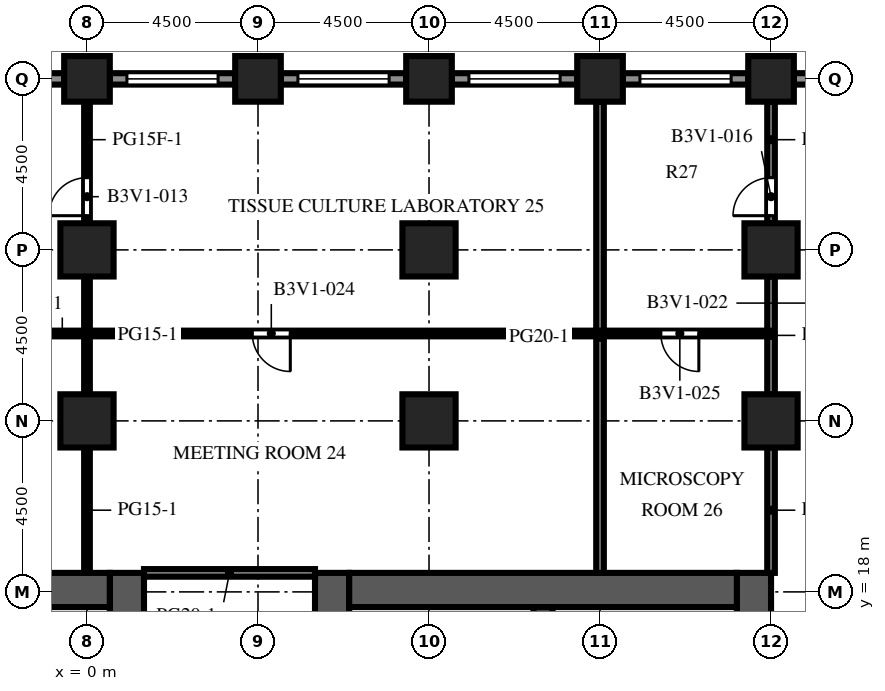
"""IFC4 building model, lengths in metres.
Left out: names, types, materials, properties, quantities, classifications, styles, units other than length and angle.
Written with IfcOpenShell. Run it as: python <this file> out.ifc"""

import sys

from ifc_helpers import new_model, si_unit, direction, frame, frame_2d, origin, origin_2d, place, context, subcontext, project, spatial, rectangle, extrude, element, fill, save


model = new_model("IFC4")
c1 = context("Model", 3, precision=1e-05, world=origin(), true_north=direction((0.0, 1.0)))
c2 = subcontext(c1, "Body", "Model", "MODEL_VIEW")
j1 = project(units=[si_unit("LENGTHUNIT", "METRE"), si_unit("PLANEANGLEUNIT", "RADIAN")], contexts=[c1])
p1 = place(None, origin())
s1 = spatial("IfcSite", under=j1, at=p1, CompositionType="ELEMENT")
p2 = place(p1, origin())
s2 = spatial("IfcBuilding", under=s1, at=p2, CompositionType="ELEMENT")
p3 = place(p2, frame((0.0, 0.0, 90.2)))
s3 = spatial("IfcBuildingStorey", under=s2, at=p3, CompositionType="ELEMENT", Elevation=90.2)
for number, where, z_axis, x_axis in (
    (1, (0.0, 31.5, 0.0), (0.0, 0.0, 1.0), (1.0, 0.0, 0.0)),
    (2, (4.5, 31.5, 0.0), (0.0, 0.0, 1.0), (1.0, 0.0, 0.0)),
    (3, (9.0, 31.5, 0.0), (0.0, 0.0, 1.0), (1.0, 0.0, 0.0)),
    (4, (13.5, 31.5, 0.0), (0.0, 0.0, 1.0), (1.0, 0.0, 0.0)),
    (5, (18.0, 31.5, 0.0), (0.0, 0.0, 1.0), (1.0, 0.0, 0.0)),
):
    element("IfcColumn", number, at=place(p3, frame(where, z_axis=z_axis, x_axis=x_axis)), inside=s3, PredefinedType="COLUMN", context=c2, shape_type="SweptSolid", body=[
        extrude(rectangle(XDim=1.2, YDim=1.2, at=origin_2d()), origin(), (0.0, 0.0, 1.0), 4.1),
    ])
for number, where, z_axis, x_axis in (
    (6, (0.0, 22.5, 0.0), (0.0, 0.0, 1.0), (1.0, 0.0, 0.0)),
    (7, (0.0, 27.0, 0.0), (0.0, 0.0, 1.0), (1.0, 0.0, 0.0)),
    (8, (9.0, 22.5, 0.0), (0.0, 0.0, 1.0), (1.0, 0.0, 0.0)),
    (9, (9.0, 27.0, 0.0), (0.0, 0.0, 1.0), (1.0, 0.0, 0.0)),
    (10, (18.0, 22.5, 0.0), (0.0, 0.0, 1.0), (1.0, 0.0, 0.0)),
    (11, (18.0, 27.0, 0.0), (0.0, 0.0, 1.0), (1.0, 0.0, 0.0)),
):
    element("IfcColumn", number, at=place(p3, frame(where, z_axis=z_axis, x_axis=x_axis)), inside=s3, PredefinedType="COLUMN", context=c2, shape_type="SweptSolid", body=[
        extrude(rectangle(XDim=1.4, YDim=1.4, at=origin_2d()), origin(), (0.0, 0.0, 1.0), 4.1),
    ])
p4 = place(p3, frame((1.05, -9.0, 0.0), z_axis=(0.0, 0.0, 1.0), x_axis=(0.0, 1.0, 0.0)))
e12 = element("IfcWall", 12, at=p4, inside=s3, PredefinedType="SHEAR", context=c2, shape_type="SweptSolid", body=[
    extrude(rectangle(XDim=27.5, YDim=0.9, at=frame_2d((13.75, 0.0))), origin(), (0.0, 0.0, 1.0), 4.1),
])
p5 = place(p4, frame((12.55, 0.0, 0.0)))
e13 = element("IfcOpeningElement", 13, at=p5, cuts=e12, PredefinedType="OPENING", context=c2, shape_type="SweptSolid", body=[
    extrude(rectangle(XDim=2.4, YDim=2.4, at=frame_2d((1.2, 1.2))), frame((0.0, 0.46, 0.0), z_axis=(0.0, -1.0, 0.0), x_axis=(1.0, 0.0, 0.0)), (0.0, 0.0, 1.0), 0.92),
])
p6 = place(p4, frame((3.975, 0.0, 0.0)))
e14 = element("IfcOpeningElement", 14, at=p6, cuts=e12, PredefinedType="OPENING", context=c2, shape_type="SweptSolid", body=[
    extrude(rectangle(XDim=1.2, YDim=2.1, at=frame_2d((0.6, 1.05))), frame((0.0, 0.46, 0.0), z_axis=(0.0, -1.0, 0.0), x_axis=(1.0, 0.0, 0.0)), (0.0, 0.0, 1.0), 0.92),
])
p7 = place(p4, frame((22.325, 0.0, 0.0)))
e15 = element("IfcOpeningElement", 15, at=p7, cuts=e12, PredefinedType="OPENING", context=c2, shape_type="SweptSolid", body=[
    extrude(rectangle(XDim=1.2, YDim=2.1, at=frame_2d((0.6, 1.05))), frame((0.0, 0.46, 0.0), z_axis=(0.0, -1.0, 0.0), x_axis=(1.0, 0.0, 0.0)), (0.0, 0.0, 1.0), 0.92),
])
p8 = place(p3, frame((-9.6, 18.05, 0.0), z_axis=(0.0, 0.0, 1.0), x_axis=(1.0, 0.0, 0.0)))
e16 = element("IfcWall", 16, at=p8, inside=s3, PredefinedType="SHEAR", context=c2, shape_type="SweptSolid", body=[
    extrude(rectangle(XDim=10.2, YDim=0.9, at=frame_2d((5.1, 0.0))), origin(), (0.0, 0.0, 1.0), 4.1),
])
p9 = place(p3, frame((6.45, -9.0, 0.0), z_axis=(0.0, 0.0, 1.0), x_axis=(0.0, 1.0, 0.0)))
e17 = element("IfcWall", 17, at=p9, inside=s3, PredefinedType="SHEAR", context=c2, shape_type="SweptSolid", body=[
    extrude(rectangle(XDim=27.5, YDim=0.9, at=frame_2d((13.75, 0.0))), origin(), (0.0, 0.0, 1.0), 4.1),
])
p10 = place(p9, frame((12.55, 0.0, 0.0)))
e18 = element("IfcOpeningElement", 18, at=p10, cuts=e17, PredefinedType="OPENING", context=c2, shape_type="SweptSolid", body=[
    extrude(rectangle(XDim=2.4, YDim=2.4, at=frame_2d((1.2, 1.2))), frame((0.0, 0.46, 0.0), z_axis=(0.0, -1.0, 0.0), x_axis=(1.0, 0.0, 0.0)), (0.0, 0.0, 1.0), 0.92),
])
p11 = place(p9, frame((3.975, 0.0, 0.0)))
e19 = element("IfcOpeningElement", 19, at=p11, cuts=e17, PredefinedType="OPENING", context=c2, shape_type="SweptSolid", body=[
    extrude(rectangle(XDim=1.2, YDim=2.1, at=frame_2d((0.6, 1.05))), frame((0.0, 0.46, 0.0), z_axis=(0.0, -1.0, 0.0), x_axis=(1.0, 0.0, 0.0)), (0.0, 0.0, 1.0), 0.92),
])
p12 = place(p9, frame((22.325, 0.0, 0.0)))
e20 = element("IfcOpeningElement", 20, at=p12, cuts=e17, PredefinedType="OPENING", context=c2, shape_type="SweptSolid", body=[
    extrude(rectangle(XDim=1.2, YDim=2.1, at=frame_2d((0.6, 1.05))), frame((0.0, 0.46, 0.0), z_axis=(0.0, -1.0, 0.0), x_axis=(1.0, 0.0, 0.0)), (0.0, 0.0, 1.0), 0.92),
])
p13 = place(p3, frame((17.55, -9.0, 0.0), z_axis=(0.0, 0.0, 1.0), x_axis=(0.0, 1.0, 0.0)))
e21 = element("IfcWall", 21, at=p13, inside=s3, PredefinedType="SHEAR", context=c2, shape_type="SweptSolid", body=[
    extrude(rectangle(XDim=27.5, YDim=0.9, at=frame_2d((13.75, 0.0))), origin(), (0.0, 0.0, 1.0), 4.1),
])
p14 = place(p13, frame((12.55, 0.0, 0.0)))
e22 = element("IfcOpeningElement", 22, at=p14, cuts=e21, PredefinedType="OPENING", context=c2, shape_type="SweptSolid", body=[
    extrude(rectangle(XDim=2.4, YDim=2.4, at=frame_2d((1.2, 1.2))), frame((0.0, 0.46, 0.0), z_axis=(0.0, -1.0, 0.0), x_axis=(1.0, 0.0, 0.0)), (0.0, 0.0, 1.0), 0.92),
])
p15 = place(p13, frame((6.825, 0.0, 0.0)))
e23 = element("IfcOpeningElement", 23, at=p15, cuts=e21, PredefinedType="OPENING", context=c2, shape_type="SweptSolid", body=[
    extrude(rectangle(XDim=1.2, YDim=2.1, at=frame_2d((0.6, 1.05))), frame((0.0, 0.46, 0.0), z_axis=(0.0, -1.0, 0.0), x_axis=(1.0, 0.0, 0.0)), (0.0, 0.0, 1.0), 0.92),
])
p16 = place(p13, frame((19.475, 0.0, 0.0)))
e24 = element("IfcOpeningElement", 24, at=p16, cuts=e21, PredefinedType="OPENING", context=c2, shape_type="SweptSolid", body=[
    extrude(rectangle(XDim=1.2, YDim=2.1, at=frame_2d((0.6, 1.05))), frame((0.0, 0.46, 0.0), z_axis=(0.0, -1.0, 0.0), x_axis=(1.0, 0.0, 0.0)), (0.0, 0.0, 1.0), 0.92),
])
p17 = place(p3, frame((6.9, 18.05, 0.0), z_axis=(0.0, 0.0, 1.0), x_axis=(1.0, 0.0, 0.0)))
e25 = element("IfcWall", 25, at=p17, inside=s3, PredefinedType="SHEAR", context=c2, shape_type="SweptSolid", body=[
    extrude(rectangle(XDim=10.2, YDim=0.9, at=frame_2d((5.1, 0.0))), origin(), (0.0, 0.0, 1.0), 4.1),
])
p18 = place(p3, frame((12.0, 10.25, 0.0), z_axis=(0.0, 0.0, 1.0), x_axis=(0.0, 1.0, 0.0)))
e26 = element("IfcWall", 26, at=p18, inside=s3, PredefinedType="SHEAR", context=c2, shape_type="SweptSolid", body=[
    extrude(rectangle(XDim=7.35, YDim=0.5, at=frame_2d((3.675, 0.0))), origin(), (0.0, 0.0, 1.0), 4.1),
])
p19 = place(p3, frame((18.6, 31.5, 0.0), z_axis=(0.0, 0.0, 1.0), x_axis=(1.0, 0.0, 0.0)))
e27 = element("IfcWall", 27, at=p19, inside=s3, PredefinedType="SOLIDWALL", context=c2, shape_type="SweptSolid", body=[
    extrude(rectangle(XDim=3.3, YDim=0.3, at=frame_2d((1.65, 0.0))), origin(), (0.0, 0.0, 1.0), 2.75),
])
p20 = place(p19, frame((1.15, 0.0, 0.0)))
e28 = element("IfcOpeningElement", 28, at=p20, cuts=e27, PredefinedType="OPENING", context=c2, shape_type="SweptSolid", body=[
    extrude(rectangle(XDim=1.0, YDim=2.2, at=frame_2d((0.5, 1.1))), frame((0.0, 0.16, 0.0), z_axis=(0.0, -1.0, 0.0), x_axis=(1.0, 0.0, 0.0)), (0.0, 0.0, 1.0), 0.32),
])
p21 = place(p3, frame((14.1, 31.5, 0.0), z_axis=(0.0, 0.0, 1.0), x_axis=(1.0, 0.0, 0.0)))
e29 = element("IfcWall", 29, at=p21, inside=s3, PredefinedType="SOLIDWALL", context=c2, shape_type="SweptSolid", body=[
    extrude(rectangle(XDim=3.3, YDim=0.3, at=frame_2d((1.65, 0.0))), origin(), (0.0, 0.0, 1.0), 2.75),
])
p22 = place(p21, frame((0.45, 0.0, 0.8)))
e30 = element("IfcOpeningElement", 30, at=p22, cuts=e29, PredefinedType="OPENING", context=c2, shape_type="SweptSolid", body=[
    extrude(rectangle(XDim=2.4, YDim=1.7, at=frame_2d((1.2, 0.85))), frame((0.0, 0.16, 0.0), z_axis=(0.0, -1.0, 0.0), x_axis=(1.0, 0.0, 0.0)), (0.0, 0.0, 1.0), 0.32),
])
p23 = place(p3, frame((9.6, 31.5, 0.0), z_axis=(0.0, 0.0, 1.0), x_axis=(1.0, 0.0, 0.0)))
e31 = element("IfcWall", 31, at=p23, inside=s3, PredefinedType="SOLIDWALL", context=c2, shape_type="SweptSolid", body=[
    extrude(rectangle(XDim=3.3, YDim=0.3, at=frame_2d((1.65, 0.0))), origin(), (0.0, 0.0, 1.0), 2.75),
])
p24 = place(p23, frame((0.45, 0.0, 0.8)))
e32 = element("IfcOpeningElement", 32, at=p24, cuts=e31, PredefinedType="OPENING", context=c2, shape_type="SweptSolid", body=[
    extrude(rectangle(XDim=2.4, YDim=1.7, at=frame_2d((1.2, 0.85))), frame((0.0, 0.16, 0.0), z_axis=(0.0, -1.0, 0.0), x_axis=(1.0, 0.0, 0.0)), (0.0, 0.0, 1.0), 0.32),
])
p25 = place(p3, frame((5.1, 31.5, 0.0), z_axis=(0.0, 0.0, 1.0), x_axis=(1.0, 0.0, 0.0)))
e33 = element("IfcWall", 33, at=p25, inside=s3, PredefinedType="SOLIDWALL", context=c2, shape_type="SweptSolid", body=[
    extrude(rectangle(XDim=3.3, YDim=0.3, at=frame_2d((1.65, 0.0))), origin(), (0.0, 0.0, 1.0), 2.75),
])
p26 = place(p25, frame((0.45, 0.0, 0.8)))
e34 = element("IfcOpeningElement", 34, at=p26, cuts=e33, PredefinedType="OPENING", context=c2, shape_type="SweptSolid", body=[
    extrude(rectangle(XDim=2.4, YDim=1.7, at=frame_2d((1.2, 0.85))), frame((0.0, 0.16, 0.0), z_axis=(0.0, -1.0, 0.0), x_axis=(1.0, 0.0, 0.0)), (0.0, 0.0, 1.0), 0.32),
])
p27 = place(p3, frame((0.6, 31.5, 0.0), z_axis=(0.0, 0.0, 1.0), x_axis=(1.0, 0.0, 0.0)))
e35 = element("IfcWall", 35, at=p27, inside=s3, PredefinedType="SOLIDWALL", context=c2, shape_type="SweptSolid", body=[
    extrude(rectangle(XDim=3.3, YDim=0.3, at=frame_2d((1.65, 0.0))), origin(), (0.0, 0.0, 1.0), 2.75),
])
p28 = place(p27, frame((0.45, 0.0, 0.8)))
e36 = element("IfcOpeningElement", 36, at=p28, cuts=e35, PredefinedType="OPENING", context=c2, shape_type="SweptSolid", body=[
    extrude(rectangle(XDim=2.4, YDim=1.7, at=frame_2d((1.2, 0.85))), frame((0.0, 0.16, 0.0), z_axis=(0.0, -1.0, 0.0), x_axis=(1.0, 0.0, 0.0)), (0.0, 0.0, 1.0), 0.32),
])
p29 = place(p3, frame((-3.9, 31.5, 0.0), z_axis=(0.0, 0.0, 1.0), x_axis=(1.0, 0.0, 0.0)))
e37 = element("IfcWall", 37, at=p29, inside=s3, PredefinedType="SOLIDWALL", context=c2, shape_type="SweptSolid", body=[
    extrude(rectangle(XDim=3.3, YDim=0.3, at=frame_2d((1.65, 0.0))), origin(), (0.0, 0.0, 1.0), 2.75),
])
p30 = place(p29, frame((0.45, 0.0, 0.8)))
e38 = element("IfcOpeningElement", 38, at=p30, cuts=e37, PredefinedType="OPENING", context=c2, shape_type="SweptSolid", body=[
    extrude(rectangle(XDim=2.4, YDim=1.7, at=frame_2d((1.2, 0.85))), frame((0.0, 0.16, 0.0), z_axis=(0.0, -1.0, 0.0), x_axis=(1.0, 0.0, 0.0)), (0.0, 0.0, 1.0), 0.32),
])
p31 = place(p3, frame((-0.8, 14.807, 0.0), z_axis=(0.0, 0.0, 1.0), x_axis=(0.0, 1.0, 0.0)))
e39 = element("IfcWall", 39, at=p31, inside=s3, PredefinedType="PARTITIONING", context=c2, shape_type="SweptSolid", body=[
    extrude(rectangle(XDim=2.793, YDim=0.1, at=frame_2d((1.396, 0.0))), origin(), (0.0, 0.0, 1.0), 3.65),
])
p32 = place(p31, frame((0.896, 0.0, 0.0)))
e40 = element("IfcOpeningElement", 40, at=p32, cuts=e39, PredefinedType="OPENING", context=c2, shape_type="SweptSolid", body=[
    extrude(rectangle(XDim=1.0, YDim=2.1, at=frame_2d((0.5, 1.05))), frame((0.0, 0.06, 0.0), z_axis=(0.0, -1.0, 0.0), x_axis=(1.0, 0.0, 0.0)), (0.0, 0.0, 1.0), 0.12),
])
p33 = place(p3, frame((8.3, 14.807, 0.0), z_axis=(0.0, 0.0, 1.0), x_axis=(0.0, 1.0, 0.0)))
e41 = element("IfcWall", 41, at=p33, inside=s3, PredefinedType="PARTITIONING", context=c2, shape_type="SweptSolid", body=[
    extrude(rectangle(XDim=2.793, YDim=0.1, at=frame_2d((1.396, 0.0))), origin(), (0.0, 0.0, 1.0), 3.65),
])
p34 = place(p33, frame((0.896, 0.0, 0.0)))
e42 = element("IfcOpeningElement", 42, at=p34, cuts=e41, PredefinedType="OPENING", context=c2, shape_type="SweptSolid", body=[
    extrude(rectangle(XDim=1.0, YDim=2.1, at=frame_2d((0.5, 1.05))), frame((0.0, 0.06, 0.0), z_axis=(0.0, -1.0, 0.0), x_axis=(1.0, 0.0, 0.0)), (0.0, 0.0, 1.0), 0.12),
])
p35 = place(p3, frame((0.0, 18.5, 0.0), z_axis=(0.0, 0.0, 1.0), x_axis=(0.0, 1.0, 0.0)))
e43 = element("IfcWall", 43, at=p35, inside=s3, PredefinedType="PARTITIONING", context=c2, shape_type="SweptSolid", body=[
    extrude(rectangle(XDim=3.3, YDim=0.15, at=frame_2d((1.65, 0.0))), origin(), (0.0, 0.0, 1.0), 3.65),
])
p36 = place(p3, frame((0.0, 23.2, 0.0), z_axis=(0.0, 0.0, 1.0), x_axis=(0.0, 1.0, 0.0)))
e44 = element("IfcWall", 44, at=p36, inside=s3, PredefinedType="PARTITIONING", context=c2, shape_type="SweptSolid", body=[
    extrude(rectangle(XDim=3.1, YDim=0.15, at=frame_2d((1.55, 0.0))), origin(), (0.0, 0.0, 1.0), 3.65),
])
p37 = place(p3, frame((0.0, 30.9, 0.0), z_axis=(0.0, 0.0, 1.0), x_axis=(0.0, -1.0, 0.0)))
e45 = element("IfcWall", 45, at=p37, inside=s3, PredefinedType="PARTITIONING", context=c2, shape_type="SweptSolid", body=[
    extrude(rectangle(XDim=3.2, YDim=0.15, at=frame_2d((1.6, 0.0))), origin(), (0.0, 0.0, 1.0), 3.65),
])
p38 = place(p37, frame((2.0, 0.0, 0.0)))
e46 = element("IfcOpeningElement", 46, at=p38, cuts=e45, PredefinedType="OPENING", context=c2, shape_type="SweptSolid", body=[
    extrude(rectangle(XDim=1.0, YDim=2.1, at=frame_2d((0.5, 1.05))), frame((0.0, 0.085, 0.0), z_axis=(0.0, -1.0, 0.0), x_axis=(1.0, 0.0, 0.0)), (0.0, 0.0, 1.0), 0.17),
])
p39 = place(p3, frame((13.5, 18.5, 0.0), z_axis=(0.0, 0.0, 1.0), x_axis=(0.0, 1.0, 0.0)))
e47 = element("IfcWall", 47, at=p39, inside=s3, PredefinedType="PARTITIONING", context=c2, shape_type="SweptSolid", body=[
    extrude(rectangle(XDim=12.4, YDim=0.2, at=frame_2d((6.2, 0.0))), origin(), (0.0, 0.0, 1.0), 3.65),
])
p40 = place(p3, frame((18.0, 18.5, 0.0), z_axis=(0.0, 0.0, 1.0), x_axis=(0.0, 1.0, 0.0)))
e48 = element("IfcWall", 48, at=p40, inside=s3, PredefinedType="PARTITIONING", context=c2, shape_type="SweptSolid", body=[
    extrude(rectangle(XDim=3.3, YDim=0.2, at=frame_2d((1.65, 0.0))), origin(), (0.0, 0.0, 1.0), 3.65),
])
p41 = place(p3, frame((18.0, 23.2, 0.0), z_axis=(0.0, 0.0, 1.0), x_axis=(0.0, 1.0, 0.0)))
e49 = element("IfcWall", 49, at=p41, inside=s3, PredefinedType="PARTITIONING", context=c2, shape_type="SweptSolid", body=[
    extrude(rectangle(XDim=3.1, YDim=0.2, at=frame_2d((1.55, 0.0))), origin(), (0.0, 0.0, 1.0), 3.65),
])
p42 = place(p3, frame((18.0, 27.7, 0.0), z_axis=(0.0, 0.0, 1.0), x_axis=(0.0, 1.0, 0.0)))
e50 = element("IfcWall", 50, at=p42, inside=s3, PredefinedType="PARTITIONING", context=c2, shape_type="SweptSolid", body=[
    extrude(rectangle(XDim=3.2, YDim=0.2, at=frame_2d((1.6, 0.0))), origin(), (0.0, 0.0, 1.0), 3.65),
])
p43 = place(p42, frame((0.2, 0.0, 0.0)))
e51 = element("IfcOpeningElement", 51, at=p43, cuts=e50, PredefinedType="OPENING", context=c2, shape_type="SweptSolid", body=[
    extrude(rectangle(XDim=1.0, YDim=2.1, at=frame_2d((0.5, 1.05))), frame((0.0, 0.11, 0.0), z_axis=(0.0, -1.0, 0.0), x_axis=(1.0, 0.0, 0.0)), (0.0, 0.0, 1.0), 0.22),
])
p44 = place(p3, frame((1.5, 18.5, 0.0), z_axis=(0.0, 0.0, 1.0), x_axis=(1.0, 0.0, 0.0)))
e52 = element("IfcWall", 52, at=p44, inside=s3, PredefinedType="PARTITIONING", context=c2, shape_type="SweptSolid", body=[
    extrude(rectangle(XDim=4.5, YDim=0.2, at=frame_2d((2.25, 0.0))), origin(), (0.0, 0.0, 1.0), 3.65),
])
p45 = place(p3, frame((18.0, 24.8, 0.0), z_axis=(0.0, 0.0, 1.0), x_axis=(-1.0, 0.0, 0.0)))
e53 = element("IfcWall", 53, at=p45, inside=s3, PredefinedType="PARTITIONING", context=c2, shape_type="SweptSolid", body=[
    extrude(rectangle(XDim=28.5, YDim=0.15, at=frame_2d((14.25, 0.0))), origin(), (0.0, 0.0, 1.0), 3.65),
])
p46 = place(p45, frame((23.65, 0.0, 0.0)))
e54 = element("IfcOpeningElement", 54, at=p46, cuts=e53, PredefinedType="OPENING", context=c2, shape_type="SweptSolid", body=[
    extrude(rectangle(XDim=1.0, YDim=2.1, at=frame_2d((0.5, 1.05))), frame((0.0, 0.085, 0.0), z_axis=(0.0, -1.0, 0.0), x_axis=(1.0, 0.0, 0.0)), (0.0, 0.0, 1.0), 0.17),
])
p47 = place(p45, frame((12.65, 0.0, 0.0)))
e55 = element("IfcOpeningElement", 55, at=p47, cuts=e53, PredefinedType="OPENING", context=c2, shape_type="SweptSolid", body=[
    extrude(rectangle(XDim=1.0, YDim=2.1, at=frame_2d((0.5, 1.05))), frame((0.0, 0.085, 0.0), z_axis=(0.0, -1.0, 0.0), x_axis=(1.0, 0.0, 0.0)), (0.0, 0.0, 1.0), 0.17),
])
p48 = place(p45, frame((1.9, 0.0, 0.0)))
e56 = element("IfcOpeningElement", 56, at=p48, cuts=e53, PredefinedType="OPENING", context=c2, shape_type="SweptSolid", body=[
    extrude(rectangle(XDim=1.0, YDim=2.1, at=frame_2d((0.5, 1.05))), frame((0.0, 0.085, 0.0), z_axis=(0.0, -1.0, 0.0), x_axis=(1.0, 0.0, 0.0)), (0.0, 0.0, 1.0), 0.17),
])
p49 = place(p22, origin())
e57 = element("IfcWindow", 57, at=p49, inside=s3, PartitioningType="SINGLE_PANEL", PredefinedType="WINDOW", context=c2, shape_type="SweptSolid", body=[
    extrude(rectangle(XDim=2.4, YDim=1.7, at=frame_2d((1.2, 0.85))), frame((0.0, 0.03, 0.0), z_axis=(0.0, -1.0, 0.0), x_axis=(1.0, 0.0, 0.0)), (0.0, 0.0, 1.0), 0.06),
])
fill(e30, e57)
p50 = place(p24, origin())
e58 = element("IfcWindow", 58, at=p50, inside=s3, PartitioningType="SINGLE_PANEL", PredefinedType="WINDOW", context=c2, shape_type="SweptSolid", body=[
    extrude(rectangle(XDim=2.4, YDim=1.7, at=frame_2d((1.2, 0.85))), frame((0.0, 0.03, 0.0), z_axis=(0.0, -1.0, 0.0), x_axis=(1.0, 0.0, 0.0)), (0.0, 0.0, 1.0), 0.06),
])
fill(e32, e58)
p51 = place(p26, origin())
e59 = element("IfcWindow", 59, at=p51, inside=s3, PartitioningType="SINGLE_PANEL", PredefinedType="WINDOW", context=c2, shape_type="SweptSolid", body=[
    extrude(rectangle(XDim=2.4, YDim=1.7, at=frame_2d((1.2, 0.85))), frame((0.0, 0.03, 0.0), z_axis=(0.0, -1.0, 0.0), x_axis=(1.0, 0.0, 0.0)), (0.0, 0.0, 1.0), 0.06),
])
fill(e34, e59)
p52 = place(p28, origin())
e60 = element("IfcWindow", 60, at=p52, inside=s3, PartitioningType="SINGLE_PANEL", PredefinedType="WINDOW", context=c2, shape_type="SweptSolid", body=[
    extrude(rectangle(XDim=2.4, YDim=1.7, at=frame_2d((1.2, 0.85))), frame((0.0, 0.03, 0.0), z_axis=(0.0, -1.0, 0.0), x_axis=(1.0, 0.0, 0.0)), (0.0, 0.0, 1.0), 0.06),
])
fill(e36, e60)
p53 = place(p38, origin())
e61 = element("IfcDoor", 61, at=p53, inside=s3, OperationType="SINGLE_SWING_RIGHT", PredefinedType="DOOR", context=c2, shape_type="SweptSolid", body=[
    extrude(rectangle(XDim=1.0, YDim=2.1, at=frame_2d((0.5, 1.05))), frame((0.0, 0.025, 0.0), z_axis=(0.0, -1.0, 0.0), x_axis=(1.0, 0.0, 0.0)), (0.0, 0.0, 1.0), 0.05),
])
fill(e46, e61)
p54 = place(p43, origin())
e62 = element("IfcDoor", 62, at=p54, inside=s3, OperationType="SINGLE_SWING_LEFT", PredefinedType="DOOR", context=c2, shape_type="SweptSolid", body=[
    extrude(rectangle(XDim=1.0, YDim=2.1, at=frame_2d((0.5, 1.05))), frame((0.0, 0.025, 0.0), z_axis=(0.0, -1.0, 0.0), x_axis=(1.0, 0.0, 0.0)), (0.0, 0.0, 1.0), 0.05),
])
fill(e51, e62)
p55 = place(p47, origin())
e63 = element("IfcDoor", 63, at=p55, inside=s3, OperationType="SINGLE_SWING_LEFT", PredefinedType="DOOR", context=c2, shape_type="SweptSolid", body=[
    extrude(rectangle(XDim=1.0, YDim=2.1, at=frame_2d((0.5, 1.05))), frame((0.0, 0.025, 0.0), z_axis=(0.0, -1.0, 0.0), x_axis=(1.0, 0.0, 0.0)), (0.0, 0.0, 1.0), 0.05),
])
fill(e55, e63)
p56 = place(p48, origin())
e64 = element("IfcDoor", 64, at=p56, inside=s3, OperationType="SINGLE_SWING_LEFT", PredefinedType="DOOR", context=c2, shape_type="SweptSolid", body=[
    extrude(rectangle(XDim=1.0, YDim=2.1, at=frame_2d((0.5, 1.05))), frame((0.0, 0.025, 0.0), z_axis=(0.0, -1.0, 0.0), x_axis=(1.0, 0.0, 0.0)), (0.0, 0.0, 1.0), 0.05),
])
fill(e56, e64)
save(model, sys.argv[1])
